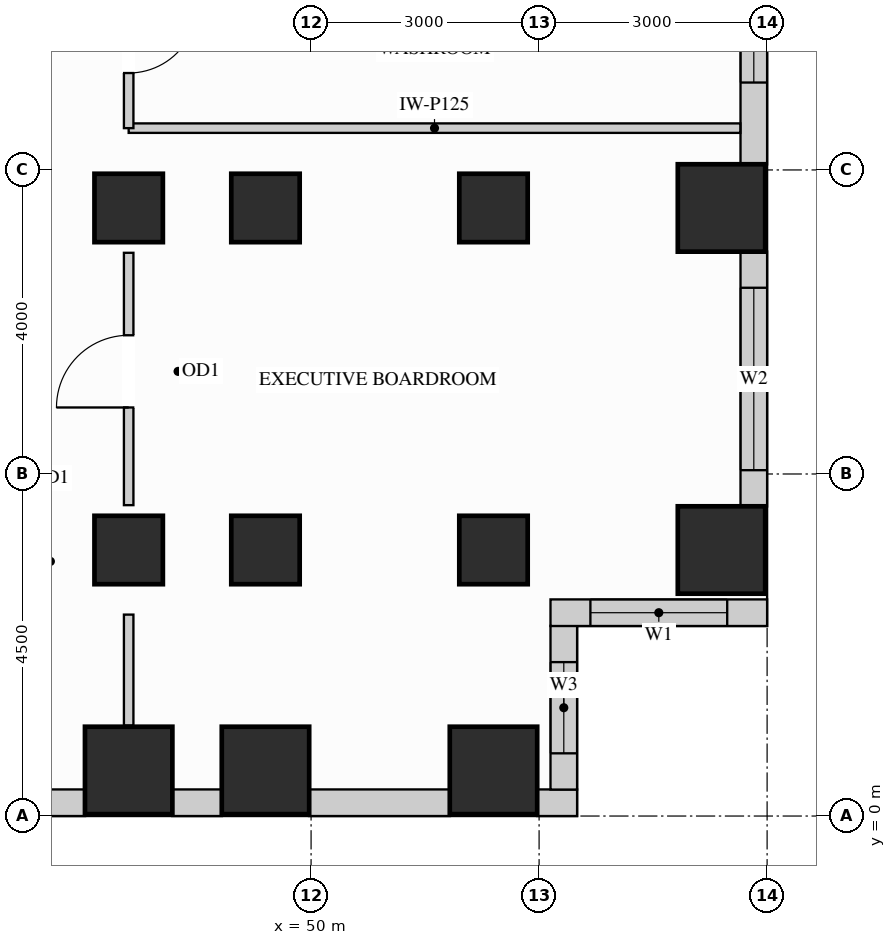
"""IFC4 building model, lengths in metres.
Left out: names, types, materials, properties, quantities, classifications, styles, units other than length and angle.
Written with IfcOpenShell. Run it as: python <this file> out.ifc"""

import sys

from ifc_helpers import new_model, si_unit, direction, frame, frame_2d, origin, origin_2d, place, context, subcontext, project, spatial, rectangle, extrude, source, transform, mapped, element, fill, save


model = new_model("IFC4")
c1 = context("Model", 3, precision=1e-05, world=origin(), true_north=direction((0.0, 1.0)))
c2 = subcontext(c1, "Body", "Model", "MODEL_VIEW")
j1 = project(units=[si_unit("LENGTHUNIT", "METRE"), si_unit("PLANEANGLEUNIT", "RADIAN")], contexts=[c1])
p1 = place(None, origin())
s1 = spatial("IfcSite", under=j1, at=p1, CompositionType="ELEMENT")
p2 = place(p1, origin())
s2 = spatial("IfcBuilding", under=s1, at=p2, CompositionType="ELEMENT")
p3 = place(p2, frame((0.0, 0.0, 106.2)))
s3 = spatial("IfcBuildingStorey", under=s2, at=p3, CompositionType="ELEMENT", Elevation=106.2)
m1 = source(origin(), c2, "Body", "SweptSolid", [
    extrude(rectangle(XDim=0.9, YDim=0.9, at=origin_2d()), origin(), (0.0, 0.0, 1.0), 3.38),
])
for number, where, z_axis, x_axis in (
    (1, (47.6, 3.5, 0.0), (0.0, 0.0, 1.0), (1.0, 0.0, 0.0)),
    (2, (47.6, 8.0, 0.0), (0.0, 0.0, 1.0), (1.0, 0.0, 0.0)),
    (3, (49.4, 3.5, 0.0), (0.0, 0.0, 1.0), (1.0, 0.0, 0.0)),
    (4, (49.4, 8.0, 0.0), (0.0, 0.0, 1.0), (1.0, 0.0, 0.0)),
    (5, (52.4, 3.5, 0.0), (0.0, 0.0, 1.0), (1.0, 0.0, 0.0)),
    (6, (52.4, 8.0, 0.0), (0.0, 0.0, 1.0), (1.0, 0.0, 0.0)),
):
    element("IfcColumn", number, at=place(p3, frame(where, z_axis=z_axis, x_axis=x_axis)), inside=s3, PredefinedType="COLUMN", context=c2, shape_type="MappedRepresentation", body=[
        mapped(m1, transform((0.0, 0.0, 0.0), x_axis=(1.0, 0.0, 0.0), y_axis=(0.0, 1.0, 0.0), z_axis=(0.0, 0.0, 1.0))),
    ])
m2 = source(origin(), c2, "Body", "SweptSolid", [
    extrude(rectangle(XDim=1.15, YDim=1.15, at=origin_2d()), origin(), (0.0, 0.0, 1.0), 3.38),
])
for number, where, z_axis, x_axis in (
    (7, (55.4, 3.5, 0.0), (0.0, 0.0, 1.0), (1.0, 0.0, 0.0)),
    (8, (55.4, 8.0, 0.0), (0.0, 0.0, 1.0), (1.0, 0.0, 0.0)),
    (9, (47.6, 0.6, 0.0), (0.0, 0.0, 1.0), (1.0, 0.0, 0.0)),
    (10, (49.4, 0.6, 0.0), (0.0, 0.0, 1.0), (1.0, 0.0, 0.0)),
    (11, (52.4, 0.6, 0.0), (0.0, 0.0, 1.0), (1.0, 0.0, 0.0)),
):
    element("IfcColumn", number, at=place(p3, frame(where, z_axis=z_axis, x_axis=x_axis)), inside=s3, PredefinedType="COLUMN", context=c2, shape_type="MappedRepresentation", body=[
        mapped(m2, transform((0.0, 0.0, 0.0), x_axis=(1.0, 0.0, 0.0), y_axis=(0.0, 1.0, 0.0), z_axis=(0.0, 0.0, 1.0))),
    ])
p4 = place(p3, frame((40.573, 0.175, 0.0), z_axis=(0.0, 0.0, 1.0), x_axis=(1.0, 0.0, 0.0)))
e12 = element("IfcWall", 12, at=p4, inside=s3, PredefinedType="SOLIDWALL", context=c2, shape_type="SweptSolid", body=[
    extrude(rectangle(XDim=6.454, YDim=0.35, at=frame_2d((3.227, 0.0))), origin(), (0.0, 0.0, 1.0), 3.365),
])
p5 = place(p4, frame((0.712, 0.0, 0.78)))
e13 = element("IfcOpeningElement", 13, at=p5, cuts=e12, PredefinedType="OPENING", context=c2, shape_type="SweptSolid", body=[
    extrude(rectangle(XDim=1.8, YDim=2.1, at=frame_2d((0.9, 1.05))), frame((0.0, 0.185, 0.0), z_axis=(0.0, -1.0, 0.0), x_axis=(1.0, 0.0, 0.0)), (0.0, 0.0, 1.0), 0.37),
])
p6 = place(p4, frame((2.905, 0.0, 0.78)))
e14 = element("IfcOpeningElement", 14, at=p6, cuts=e12, PredefinedType="OPENING", context=c2, shape_type="SweptSolid", body=[
    extrude(rectangle(XDim=1.8, YDim=2.1, at=frame_2d((0.9, 1.05))), frame((0.0, 0.185, 0.0), z_axis=(0.0, -1.0, 0.0), x_axis=(1.0, 0.0, 0.0)), (0.0, 0.0, 1.0), 0.37),
])
m3 = source(origin(), c2, "Body", "SweptSolid", [
    extrude(rectangle(XDim=0.654, YDim=0.35, at=frame_2d((0.327, 0.0))), origin(), (0.0, 0.0, 1.0), 3.365),
])
p7 = place(p3, frame((48.173, 0.175, 0.0), z_axis=(0.0, 0.0, 1.0), x_axis=(1.0, 0.0, 0.0)))
e15 = element("IfcWall", 15, at=p7, inside=s3, PredefinedType="SOLIDWALL", context=c2, shape_type="MappedRepresentation", body=[
    mapped(m3, transform((0.0, 0.0, 0.0), x_axis=(1.0, 0.0, 0.0), y_axis=(0.0, 1.0, 0.0), z_axis=(0.0, 0.0, 1.0))),
])
m4 = source(origin(), c2, "Body", "SweptSolid", [
    extrude(rectangle(XDim=1.854, YDim=0.35, at=frame_2d((0.927, 0.0))), origin(), (0.0, 0.0, 1.0), 3.365),
])
p8 = place(p3, frame((49.973, 0.175, 0.0), z_axis=(0.0, 0.0, 1.0), x_axis=(1.0, 0.0, 0.0)))
e16 = element("IfcWall", 16, at=p8, inside=s3, PredefinedType="SOLIDWALL", context=c2, shape_type="MappedRepresentation", body=[
    mapped(m4, transform((0.0, 0.0, 0.0), x_axis=(1.0, 0.0, 0.0), y_axis=(0.0, 1.0, 0.0), z_axis=(0.0, 0.0, 1.0))),
])
m5 = source(origin(), c2, "Body", "SweptSolid", [
    extrude(rectangle(XDim=0.527, YDim=0.35, at=frame_2d((0.264, 0.0))), origin(), (0.0, 0.0, 1.0), 3.365),
])
p9 = place(p3, frame((52.973, 0.175, 0.0), z_axis=(0.0, 0.0, 1.0), x_axis=(1.0, 0.0, 0.0)))
e17 = element("IfcWall", 17, at=p9, inside=s3, PredefinedType="SOLIDWALL", context=c2, shape_type="MappedRepresentation", body=[
    mapped(m5, transform((0.0, 0.0, 0.0), x_axis=(1.0, 0.0, 0.0), y_axis=(0.0, 1.0, 0.0), z_axis=(0.0, 0.0, 1.0))),
])
p10 = place(p3, frame((53.325, 0.348, 0.0), z_axis=(0.0, 0.0, 1.0), x_axis=(0.0, 1.0, 0.0)))
e18 = element("IfcWall", 18, at=p10, inside=s3, PredefinedType="SOLIDWALL", context=c2, shape_type="SweptSolid", body=[
    extrude(rectangle(XDim=2.154, YDim=0.35, at=frame_2d((1.077, 0.0))), origin(), (0.0, 0.0, 1.0), 3.365),
])
p11 = place(p10, frame((0.477, 0.0, 0.78)))
e19 = element("IfcOpeningElement", 19, at=p11, cuts=e18, PredefinedType="OPENING", context=c2, shape_type="SweptSolid", body=[
    extrude(rectangle(XDim=1.2, YDim=2.1, at=frame_2d((0.6, 1.05))), frame((0.0, 0.185, 0.0), z_axis=(0.0, -1.0, 0.0), x_axis=(1.0, 0.0, 0.0)), (0.0, 0.0, 1.0), 0.37),
])
p12 = place(p3, frame((53.15, 2.675, 0.0), z_axis=(0.0, 0.0, 1.0), x_axis=(1.0, 0.0, 0.0)))
e20 = element("IfcWall", 20, at=p12, inside=s3, PredefinedType="SOLIDWALL", context=c2, shape_type="SweptSolid", body=[
    extrude(rectangle(XDim=2.85, YDim=0.35, at=frame_2d((1.425, 0.0))), origin(), (0.0, 0.0, 1.0), 3.365),
])
p13 = place(p12, frame((0.525, 0.0, 0.78)))
e21 = element("IfcOpeningElement", 21, at=p13, cuts=e20, PredefinedType="OPENING", context=c2, shape_type="SweptSolid", body=[
    extrude(rectangle(XDim=1.8, YDim=2.1, at=frame_2d((0.9, 1.05))), frame((0.0, 0.185, 0.0), z_axis=(0.0, -1.0, 0.0), x_axis=(1.0, 0.0, 0.0)), (0.0, 0.0, 1.0), 0.37),
])
p14 = place(p3, frame((55.825, 4.073, 0.0), z_axis=(0.0, 0.0, 1.0), x_axis=(0.0, 1.0, 0.0)))
e22 = element("IfcWall", 22, at=p14, inside=s3, PredefinedType="SOLIDWALL", context=c2, shape_type="SweptSolid", body=[
    extrude(rectangle(XDim=3.354, YDim=0.35, at=frame_2d((1.677, 0.0))), origin(), (0.0, 0.0, 1.0), 3.365),
])
p15 = place(p14, frame((0.477, 0.0, 0.78)))
e23 = element("IfcOpeningElement", 23, at=p15, cuts=e22, PredefinedType="OPENING", context=c2, shape_type="SweptSolid", body=[
    extrude(rectangle(XDim=2.4, YDim=2.1, at=frame_2d((1.2, 1.05))), frame((0.0, 0.185, 0.0), z_axis=(0.0, -1.0, 0.0), x_axis=(1.0, 0.0, 0.0)), (0.0, 0.0, 1.0), 0.37),
])
p16 = place(p3, frame((55.825, 8.573, 0.0), z_axis=(0.0, 0.0, 1.0), x_axis=(0.0, 1.0, 0.0)))
e24 = element("IfcWall", 24, at=p16, inside=s3, PredefinedType="SOLIDWALL", context=c2, shape_type="SweptSolid", body=[
    extrude(rectangle(XDim=4.354, YDim=0.35, at=frame_2d((2.177, 0.0))), origin(), (0.0, 0.0, 1.0), 3.365),
])
p17 = place(p16, frame((1.077, 0.0, 0.78)))
e25 = element("IfcOpeningElement", 25, at=p17, cuts=e24, PredefinedType="OPENING", context=c2, shape_type="SweptSolid", body=[
    extrude(rectangle(XDim=1.2, YDim=2.1, at=frame_2d((0.6, 1.05))), frame((0.0, 0.185, 0.0), z_axis=(0.0, -1.0, 0.0), x_axis=(1.0, 0.0, 0.0)), (0.0, 0.0, 1.0), 0.37),
])
m6 = source(origin(), c2, "Body", "SweptSolid", [
    extrude(rectangle(XDim=8.048, YDim=0.125, at=frame_2d((4.024, 0.0))), origin(), (0.0, 0.0, 1.0), 3.365),
])
p18 = place(p3, frame((47.6, 9.05, 0.0), z_axis=(0.0, 0.0, 1.0), x_axis=(1.0, 0.0, 0.0)))
e26 = element("IfcWall", 26, at=p18, inside=s3, PredefinedType="PARTITIONING", context=c2, shape_type="MappedRepresentation", body=[
    mapped(m6, transform((0.0, 0.0, 0.0), x_axis=(1.0, 0.0, 0.0), y_axis=(0.0, 1.0, 0.0), z_axis=(0.0, 0.0, 1.0))),
])
p19 = place(p3, frame((47.6, 4.09, 0.0), z_axis=(0.0, 0.0, 1.0), x_axis=(0.0, 1.0, 0.0)))
e27 = element("IfcWall", 27, at=p19, inside=s3, PredefinedType="PARTITIONING", context=c2, shape_type="SweptSolid", body=[
    extrude(rectangle(XDim=3.32, YDim=0.125, at=frame_2d((1.66, 0.0))), origin(), (0.0, 0.0, 1.0), 2.677),
])
p20 = place(p19, frame((1.285, 0.0, 0.0)))
e28 = element("IfcOpeningElement", 28, at=p20, cuts=e27, PredefinedType="OPENING", context=c2, shape_type="SweptSolid", body=[
    extrude(rectangle(XDim=0.95, YDim=2.15, at=frame_2d((0.475, 1.075))), frame((0.0, 0.073, 0.0), z_axis=(0.0, -1.0, 0.0), x_axis=(1.0, 0.0, 0.0)), (0.0, 0.0, 1.0), 0.145),
])
m7 = source(origin(), c2, "Body", "SweptSolid", [
    extrude(rectangle(XDim=1.46, YDim=0.125, at=frame_2d((0.73, 0.0))), origin(), (0.0, 0.0, 1.0), 2.677),
])
p21 = place(p3, frame((47.6, 1.19, 0.0), z_axis=(0.0, 0.0, 1.0), x_axis=(0.0, 1.0, 0.0)))
e29 = element("IfcWall", 29, at=p21, inside=s3, PredefinedType="PARTITIONING", context=c2, shape_type="MappedRepresentation", body=[
    mapped(m7, transform((0.0, 0.0, 0.0), x_axis=(1.0, 0.0, 0.0), y_axis=(0.0, 1.0, 0.0), z_axis=(0.0, 0.0, 1.0))),
])
p22 = place(p3, frame((47.6, 9.05, 0.0), z_axis=(0.0, 0.0, 1.0), x_axis=(0.0, 1.0, 0.0)))
e30 = element("IfcWall", 30, at=p22, inside=s3, PredefinedType="PARTITIONING", context=c2, shape_type="SweptSolid", body=[
    extrude(rectangle(XDim=2.4, YDim=0.125, at=frame_2d((1.2, 0.0))), origin(), (0.0, 0.0, 1.0), 2.677),
])
p23 = place(p22, frame((0.725, 0.0, 0.0)))
e31 = element("IfcOpeningElement", 31, at=p23, cuts=e30, PredefinedType="OPENING", context=c2, shape_type="SweptSolid", body=[
    extrude(rectangle(XDim=0.9, YDim=2.15, at=frame_2d((0.45, 1.075))), frame((0.0, 0.073, 0.0), z_axis=(0.0, -1.0, 0.0), x_axis=(1.0, 0.0, 0.0)), (0.0, 0.0, 1.0), 0.145),
])
m8 = source(origin(), c2, "Body", "SweptSolid", [
    extrude(rectangle(XDim=0.95, YDim=2.15, at=frame_2d((0.475, 1.075))), frame((0.0, 0.025, 0.0), z_axis=(0.0, -1.0, 0.0), x_axis=(1.0, 0.0, 0.0)), (0.0, 0.0, 1.0), 0.05),
])
p24 = place(p20, origin())
e32 = element("IfcDoor", 32, at=p24, inside=s3, OperationType="SINGLE_SWING_LEFT", PredefinedType="DOOR", context=c2, shape_type="MappedRepresentation", body=[
    mapped(m8, transform((0.0, 0.0, 0.0), x_axis=(1.0, 0.0, 0.0), y_axis=(0.0, 1.0, 0.0), z_axis=(0.0, 0.0, 1.0))),
])
fill(e28, e32)
m9 = source(origin(), c2, "Body", "SweptSolid", [
    extrude(rectangle(XDim=0.9, YDim=2.15, at=frame_2d((0.45, 1.075))), frame((0.0, 0.025, 0.0), z_axis=(0.0, -1.0, 0.0), x_axis=(1.0, 0.0, 0.0)), (0.0, 0.0, 1.0), 0.05),
])
p25 = place(p23, origin())
e33 = element("IfcDoor", 33, at=p25, inside=s3, OperationType="SINGLE_SWING_RIGHT", PredefinedType="DOOR", context=c2, shape_type="MappedRepresentation", body=[
    mapped(m9, transform((0.0, 0.0, 0.0), x_axis=(1.0, 0.0, 0.0), y_axis=(0.0, 1.0, 0.0), z_axis=(0.0, 0.0, 1.0))),
])
fill(e31, e33)
m10 = source(origin(), c2, "Body", "SweptSolid", [
    extrude(rectangle(XDim=1.8, YDim=2.1, at=frame_2d((0.9, 1.05))), frame((0.0, 0.03, 0.0), z_axis=(0.0, -1.0, 0.0), x_axis=(1.0, 0.0, 0.0)), (0.0, 0.0, 1.0), 0.06),
])
p26 = place(p13, origin())
e34 = element("IfcWindow", 34, at=p26, inside=s3, PartitioningType="SINGLE_PANEL", PredefinedType="WINDOW", context=c2, shape_type="MappedRepresentation", body=[
    mapped(m10, transform((0.0, 0.0, 0.0), x_axis=(1.0, 0.0, 0.0), y_axis=(0.0, 1.0, 0.0), z_axis=(0.0, 0.0, 1.0))),
])
fill(e21, e34)
m11 = source(origin(), c2, "Body", "SweptSolid", [
    extrude(rectangle(XDim=2.4, YDim=2.1, at=frame_2d((1.2, 1.05))), frame((0.0, 0.03, 0.0), z_axis=(0.0, -1.0, 0.0), x_axis=(1.0, 0.0, 0.0)), (0.0, 0.0, 1.0), 0.06),
])
p27 = place(p15, origin())
e35 = element("IfcWindow", 35, at=p27, inside=s3, PartitioningType="SINGLE_PANEL", PredefinedType="WINDOW", context=c2, shape_type="MappedRepresentation", body=[
    mapped(m11, transform((0.0, 0.0, 0.0), x_axis=(1.0, 0.0, 0.0), y_axis=(0.0, 1.0, 0.0), z_axis=(0.0, 0.0, 1.0))),
])
fill(e23, e35)
m12 = source(origin(), c2, "Body", "SweptSolid", [
    extrude(rectangle(XDim=1.2, YDim=2.1, at=frame_2d((0.6, 1.05))), frame((0.0, 0.03, 0.0), z_axis=(0.0, -1.0, 0.0), x_axis=(1.0, 0.0, 0.0)), (0.0, 0.0, 1.0), 0.06),
])
p28 = place(p11, origin())
e36 = element("IfcWindow", 36, at=p28, inside=s3, PartitioningType="SINGLE_PANEL", PredefinedType="WINDOW", context=c2, shape_type="MappedRepresentation", body=[
    mapped(m12, transform((0.0, 0.0, 0.0), x_axis=(1.0, 0.0, 0.0), y_axis=(0.0, 1.0, 0.0), z_axis=(0.0, 0.0, 1.0))),
])
fill(e19, e36)
p29 = place(p17, origin())
e37 = element("IfcWindow", 37, at=p29, inside=s3, PartitioningType="SINGLE_PANEL", PredefinedType="WINDOW", context=c2, shape_type="MappedRepresentation", body=[
    mapped(m12, transform((0.0, 0.0, 0.0), x_axis=(1.0, 0.0, 0.0), y_axis=(0.0, 1.0, 0.0), z_axis=(0.0, 0.0, 1.0))),
])
fill(e25, e37)
save(model, sys.argv[1])
